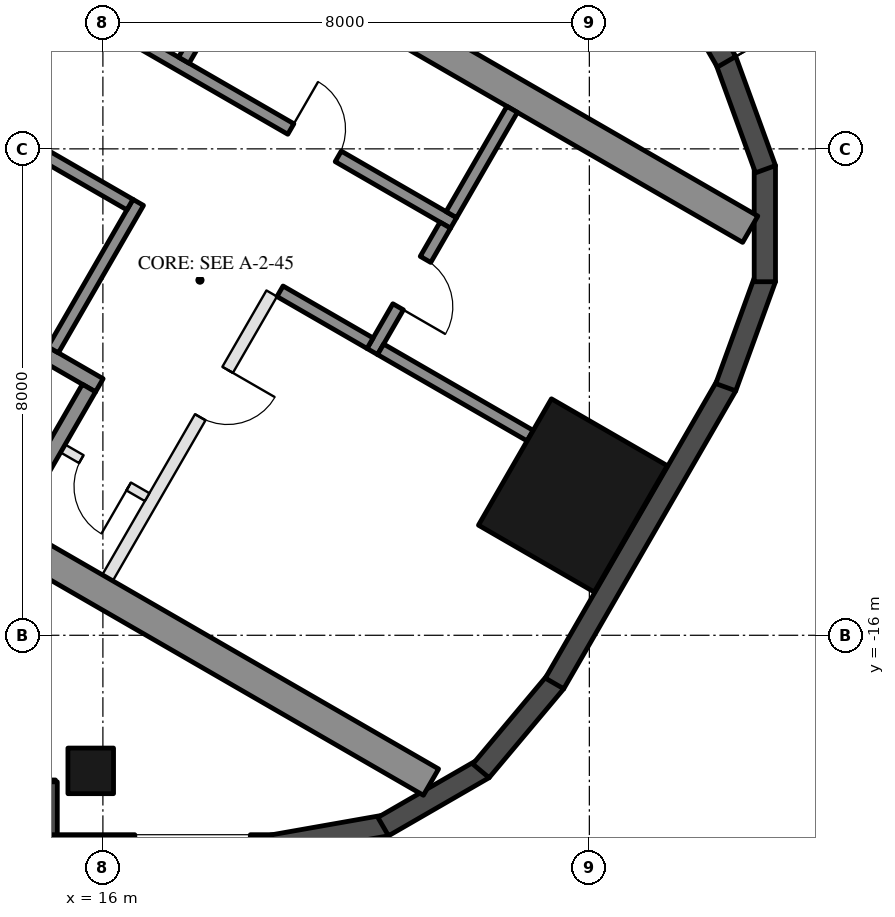
"""IFC4 building model, lengths in metres.
Left out: names, types, materials, properties, quantities, classifications, styles, units other than length and angle.
Written with IfcOpenShell. Run it as: python <this file> out.ifc"""

import sys

from ifc_helpers import new_model, si_unit, direction, frame, frame_2d, origin, origin_2d, place, context, subcontext, project, spatial, rectangle, hollow_rectangle, extrude, element, fill, save


model = new_model("IFC4")
c1 = context("Model", 3, precision=1e-05, world=origin(), true_north=direction((0.0, 1.0)))
c2 = subcontext(c1, "Body", "Model", "MODEL_VIEW")
j1 = project(units=[si_unit("LENGTHUNIT", "METRE"), si_unit("PLANEANGLEUNIT", "RADIAN")], contexts=[c1])
p1 = place(None, origin())
s1 = spatial("IfcSite", under=j1, at=p1, CompositionType="ELEMENT")
p2 = place(p1, origin())
s2 = spatial("IfcBuilding", under=s1, at=p2, CompositionType="ELEMENT")
p3 = place(p2, frame((0.0, 0.0, 198.4)))
s3 = spatial("IfcBuildingStorey", under=s2, at=p3, CompositionType="ELEMENT", Elevation=198.4)
p4 = place(p3, frame((15.8, -18.23, 0.0), z_axis=(0.0, 0.0, 1.0), x_axis=(-1.0, 0.0, 0.0)))
e1 = element("IfcColumn", 1, at=p4, inside=s3, PredefinedType="COLUMN", context=c2, shape_type="SweptSolid", body=[
    extrude(hollow_rectangle(XDim=0.75, YDim=0.75, WallThickness=0.035, at=origin_2d()), origin(), (0.0, 0.0, 1.0), 3.7),
])
p5 = place(p3, frame((23.729, -13.7, 0.0), z_axis=(0.0, 0.0, 1.0), x_axis=(0.5, 0.866025403784, 0.0)))
e2 = element("IfcColumn", 2, at=p5, inside=s3, PredefinedType="COLUMN", context=c2, shape_type="SweptSolid", body=[
    extrude(hollow_rectangle(XDim=2.4, YDim=2.2, WallThickness=0.06, at=origin_2d()), origin(), (0.0, 0.0, 1.0), 3.7),
])
p6 = place(p3, frame((8.48, -18.555, 0.0), z_axis=(0.0, 0.0, 1.0), x_axis=(1.0, 0.0, 0.0)))
e3 = element("IfcWall", 3, at=p6, inside=s3, PredefinedType="SOLIDWALL", context=c2, shape_type="SweptSolid", body=[
    extrude(rectangle(XDim=6.74, YDim=0.35, at=frame_2d((3.37, 0.0))), origin(), (0.0, 0.0, 1.0), 3.55),
])
p7 = place(p6, frame((0.32, 0.0, 0.0)))
e4 = element("IfcOpeningElement", 4, at=p7, cuts=e3, PredefinedType="OPENING", context=c2, shape_type="SweptSolid", body=[
    extrude(rectangle(XDim=2.4, YDim=2.4, at=frame_2d((1.2, 1.2))), frame((0.0, 0.185, 0.0), z_axis=(0.0, -1.0, 0.0), x_axis=(1.0, 0.0, 0.0)), (0.0, 0.0, 1.0), 0.37),
])
p8 = place(p6, frame((3.02, 0.0, 0.3)))
e5 = element("IfcOpeningElement", 5, at=p8, cuts=e3, PredefinedType="OPENING", context=c2, shape_type="SweptSolid", body=[
    extrude(rectangle(XDim=2.9, YDim=2.65, at=frame_2d((1.45, 1.325))), frame((0.0, 0.185, 0.0), z_axis=(0.0, -1.0, 0.0), x_axis=(1.0, 0.0, 0.0)), (0.0, 0.0, 1.0), 0.37),
])
p9 = place(p3, frame((15.075, -18.41, 0.0), z_axis=(0.0, 0.0, 1.0), x_axis=(0.0, -1.0, 0.0)))
e6 = element("IfcWall", 6, at=p9, inside=s3, PredefinedType="SOLIDWALL", context=c2, shape_type="SweptSolid", body=[
    extrude(rectangle(XDim=1.22, YDim=0.35, at=frame_2d((0.61, 0.0))), origin(), (0.0, 0.0, 1.0), 3.55),
])
p10 = place(p3, frame((14.9, -19.455, 0.0), z_axis=(0.0, 0.0, 1.0), x_axis=(1.0, 0.0, 0.0)))
e7 = element("IfcWall", 7, at=p10, inside=s3, PredefinedType="SOLIDWALL", context=c2, shape_type="SweptSolid", body=[
    extrude(rectangle(XDim=3.916, YDim=0.35, at=frame_2d((1.958, 0.0))), origin(), (0.0, 0.0, 1.0), 3.55),
])
p11 = place(p10, frame((1.625, 0.0, 0.3)))
e8 = element("IfcOpeningElement", 8, at=p11, cuts=e7, PredefinedType="OPENING", context=c2, shape_type="SweptSolid", body=[
    extrude(rectangle(XDim=1.9, YDim=2.65, at=frame_2d((0.95, 1.325))), frame((0.0, 0.185, 0.0), z_axis=(0.0, -1.0, 0.0), x_axis=(1.0, 0.0, 0.0)), (0.0, 0.0, 1.0), 0.37),
])
p12 = place(p3, frame((18.785, -19.458, 0.0), z_axis=(0.0, 0.0, 1.0), x_axis=(0.984798995425, 0.173697837091, 0.0)))
e9 = element("IfcWall", 9, at=p12, inside=s3, PredefinedType="SOLIDWALL", context=c2, shape_type="SweptSolid", body=[
    extrude(rectangle(XDim=1.91, YDim=0.35, at=frame_2d((0.955, 0.0))), origin(), (0.0, 0.0, 1.0), 3.55),
])
for number, where, z_axis, x_axis in (
    (10, (20.61, -19.147, 0.0), (0.0, 0.0, 1.0), (0.866, 0.5, 0.0)),
    (11, (22.217, -18.231, 0.0), (0.0, 0.0, 1.0), (0.643, 0.766, 0.0)),
):
    element("IfcWall", number, at=place(p3, frame(where, z_axis=z_axis, x_axis=x_axis)), inside=s3, PredefinedType="SOLIDWALL", context=c2, shape_type="SweptSolid", body=[
        extrude(rectangle(XDim=1.91, YDim=0.35, at=frame_2d((0.955, 0.0))), origin(), (0.0, 0.0, 1.0), 3.55),
    ])
p13 = place(p3, frame((23.427, -16.792, 0.0), z_axis=(0.0, 0.0, 1.0), x_axis=(0.500018773155, 0.866014564827, 0.0)))
e12 = element("IfcWall", 12, at=p13, inside=s3, PredefinedType="SOLIDWALL", context=c2, shape_type="SweptSolid", body=[
    extrude(rectangle(XDim=5.658, YDim=0.35, at=frame_2d((2.829, 0.0))), origin(), (0.0, 0.0, 1.0), 3.55),
])
for number, where, z_axis, x_axis in (
    (13, (26.244, -11.92, 0.0), (0.0, 0.0, 1.0), (0.342, 0.94, 0.0)),
    (14, (26.886, -10.185, 0.0), (0.0, 0.0, 1.0), (0.0, 1.0, 0.0)),
    (15, (26.897, -8.335, 0.0), (0.0, 0.0, 1.0), (-0.342, 0.94, 0.0)),
):
    element("IfcWall", number, at=place(p3, frame(where, z_axis=z_axis, x_axis=x_axis)), inside=s3, PredefinedType="SOLIDWALL", context=c2, shape_type="SweptSolid", body=[
        extrude(rectangle(XDim=1.91, YDim=0.35, at=frame_2d((0.955, 0.0))), origin(), (0.0, 0.0, 1.0), 3.55),
    ])
p14 = place(p3, frame((26.257, -6.567, 0.0), z_axis=(0.0, 0.0, 1.0), x_axis=(-0.500023526245, 0.866011820475, 0.0)))
e16 = element("IfcWall", 16, at=p14, inside=s3, PredefinedType="SOLIDWALL", context=c2, shape_type="SweptSolid", body=[
    extrude(rectangle(XDim=11.816, YDim=0.35, at=frame_2d((5.908, 0.0))), origin(), (0.0, 0.0, 1.0), 3.55),
])
p15 = place(p14, frame((0.38, 0.0, 0.3)))
e17 = element("IfcOpeningElement", 17, at=p15, cuts=e16, PredefinedType="OPENING", context=c2, shape_type="SweptSolid", body=[
    extrude(rectangle(XDim=1.9, YDim=2.65, at=frame_2d((0.95, 1.325))), frame((0.0, 0.185, 0.0), z_axis=(0.0, -1.0, 0.0), x_axis=(1.0, 0.0, 0.0)), (0.0, 0.0, 1.0), 0.37),
])
p16 = place(p14, frame((7.791, 0.0, 0.0)))
e18 = element("IfcOpeningElement", 18, at=p16, cuts=e16, PredefinedType="OPENING", context=c2, shape_type="SweptSolid", body=[
    extrude(rectangle(XDim=2.4, YDim=2.4, at=frame_2d((1.2, 1.2))), frame((0.0, 0.185, 0.0), z_axis=(0.0, -1.0, 0.0), x_axis=(1.0, 0.0, 0.0)), (0.0, 0.0, 1.0), 0.37),
])
p17 = place(p14, frame((3.741, 0.0, 0.3)))
e19 = element("IfcOpeningElement", 19, at=p17, cuts=e16, PredefinedType="OPENING", context=c2, shape_type="SweptSolid", body=[
    extrude(rectangle(XDim=1.7, YDim=2.65, at=frame_2d((0.85, 1.325))), frame((0.0, 0.185, 0.0), z_axis=(0.0, -1.0, 0.0), x_axis=(1.0, 0.0, 0.0)), (0.0, 0.0, 1.0), 0.37),
])
p18 = place(p14, frame((5.741, 0.0, 0.3)))
e20 = element("IfcOpeningElement", 20, at=p18, cuts=e16, PredefinedType="OPENING", context=c2, shape_type="SweptSolid", body=[
    extrude(rectangle(XDim=1.7, YDim=2.65, at=frame_2d((0.85, 1.325))), frame((0.0, 0.185, 0.0), z_axis=(0.0, -1.0, 0.0), x_axis=(1.0, 0.0, 0.0)), (0.0, 0.0, 1.0), 0.37),
])
for number, where, z_axis, x_axis in (
    (21, (8.547, -10.997, 0.0), (0.0, 0.0, 1.0), (0.866, -0.5, 0.0)),
    (22, (13.797, -1.903, 0.0), (0.0, 0.0, 1.0), (0.866, -0.5, 0.0)),
):
    element("IfcWall", number, at=place(p3, frame(where, z_axis=z_axis, x_axis=x_axis)), inside=s3, PredefinedType="SHEAR", context=c2, shape_type="SweptSolid", body=[
        extrude(rectangle(XDim=14.837, YDim=0.5, at=frame_2d((7.418, 0.0))), origin(), (0.0, 0.0, 1.0), 3.5),
    ])
p19 = place(p3, frame((10.356, -8.664, 0.0), z_axis=(0.0, 0.0, 1.0), x_axis=(0.866028629588, -0.499994412703, 0.0)))
e23 = element("IfcWall", 23, at=p19, inside=s3, PredefinedType="SHEAR", context=c2, shape_type="SweptSolid", body=[
    extrude(rectangle(XDim=6.45, YDim=0.25, at=frame_2d((3.225, 0.0))), origin(), (0.0, 0.0, 1.0), 3.5),
])
p20 = place(p19, frame((0.3, 0.0, 0.0)))
e24 = element("IfcOpeningElement", 24, at=p20, cuts=e23, PredefinedType="OPENING", context=c2, shape_type="SweptSolid", body=[
    extrude(rectangle(XDim=1.0, YDim=2.1, at=frame_2d((0.5, 1.05))), frame((0.0, 0.135, 0.0), z_axis=(0.0, -1.0, 0.0), x_axis=(1.0, 0.0, 0.0)), (0.0, 0.0, 1.0), 0.27),
])
p21 = place(p3, frame((14.496, -14.143, 0.0), z_axis=(0.0, 0.0, 1.0), x_axis=(0.500062241894, 0.865989465428, 0.0)))
e25 = element("IfcWall", 25, at=p21, inside=s3, PredefinedType="SHEAR", context=c2, shape_type="SweptSolid", body=[
    extrude(rectangle(XDim=2.55, YDim=0.25, at=frame_2d((1.275, 0.0))), origin(), (0.0, 0.0, 1.0), 3.5),
])
p22 = place(p3, frame((15.181, -11.305, 0.0), z_axis=(0.0, 0.0, 1.0), x_axis=(0.49994636267, 0.866056369097, 0.0)))
e26 = element("IfcWall", 26, at=p22, inside=s3, PredefinedType="SHEAR", context=c2, shape_type="SweptSolid", body=[
    extrude(rectangle(XDim=2.8, YDim=0.2, at=frame_2d((1.4, 0.0))), origin(), (0.0, 0.0, 1.0), 3.5),
])
p23 = place(p3, frame((14.02, -7.517, 0.0), z_axis=(0.0, 0.0, 1.0), x_axis=(0.866034573852, -0.49998411664, 0.0)))
e27 = element("IfcWall", 27, at=p23, inside=s3, PredefinedType="SHEAR", context=c2, shape_type="SweptSolid", body=[
    extrude(rectangle(XDim=2.8, YDim=0.2, at=frame_2d((1.4, 0.0))), origin(), (0.0, 0.0, 1.0), 3.5),
])
p24 = place(p3, frame((12.968, -4.138, 0.0), z_axis=(0.0, 0.0, 1.0), x_axis=(0.866028328073, -0.49999493495, 0.0)))
e28 = element("IfcWall", 28, at=p24, inside=s3, PredefinedType="SHEAR", context=c2, shape_type="SweptSolid", body=[
    extrude(rectangle(XDim=10.16, YDim=0.2, at=frame_2d((5.08, 0.0))), origin(), (0.0, 0.0, 1.0), 3.5),
])
p25 = place(p24, frame((1.99, 0.0, 0.0)))
e29 = element("IfcOpeningElement", 29, at=p25, cuts=e28, PredefinedType="OPENING", context=c2, shape_type="SweptSolid", body=[
    extrude(rectangle(XDim=0.9, YDim=2.1, at=frame_2d((0.45, 1.05))), frame((0.0, 0.11, 0.0), z_axis=(0.0, -1.0, 0.0), x_axis=(1.0, 0.0, 0.0)), (0.0, 0.0, 1.0), 0.22),
])
p26 = place(p24, frame((7.07, 0.0, 0.0)))
e30 = element("IfcOpeningElement", 30, at=p26, cuts=e28, PredefinedType="OPENING", context=c2, shape_type="SweptSolid", body=[
    extrude(rectangle(XDim=0.9, YDim=2.1, at=frame_2d((0.45, 1.05))), frame((0.0, 0.11, 0.0), z_axis=(0.0, -1.0, 0.0), x_axis=(1.0, 0.0, 0.0)), (0.0, 0.0, 1.0), 0.22),
])
p27 = place(p3, frame((20.43, -11.333, 0.0), z_axis=(0.0, 0.0, 1.0), x_axis=(0.500001309137, 0.866024647952, 0.0)))
e31 = element("IfcWall", 31, at=p27, inside=s3, PredefinedType="SHEAR", context=c2, shape_type="SweptSolid", body=[
    extrude(rectangle(XDim=2.4, YDim=0.2, at=frame_2d((1.2, 0.0))), origin(), (0.0, 0.0, 1.0), 3.5),
])
p28 = place(p27, frame((0.85, 0.0, 0.0)))
e32 = element("IfcOpeningElement", 32, at=p28, cuts=e31, PredefinedType="OPENING", context=c2, shape_type="SweptSolid", body=[
    extrude(rectangle(XDim=0.9, YDim=2.1, at=frame_2d((0.45, 1.05))), frame((0.0, 0.11, 0.0), z_axis=(0.0, -1.0, 0.0), x_axis=(1.0, 0.0, 0.0)), (0.0, 0.0, 1.0), 0.22),
])
p29 = place(p3, frame((18.913, -10.342, 0.0), z_axis=(0.0, 0.0, 1.0), x_axis=(0.866038183914, -0.499977863513, 0.0)))
e33 = element("IfcWall", 33, at=p29, inside=s3, PredefinedType="SHEAR", context=c2, shape_type="SweptSolid", body=[
    extrude(rectangle(XDim=1.71, YDim=0.2, at=frame_2d((0.855, 0.0))), origin(), (0.0, 0.0, 1.0), 3.5),
])
for number, where, z_axis, x_axis in (
    (34, (17.331, -6.542, 0.0), (0.0, 0.0, 1.0), (0.5, 0.866, 0.0)),
    (35, (21.73, -9.082, 0.0), (0.0, 0.0, 1.0), (0.5, 0.866, 0.0)),
):
    element("IfcWall", number, at=place(p3, frame(where, z_axis=z_axis, x_axis=x_axis)), inside=s3, PredefinedType="SHEAR", context=c2, shape_type="SweptSolid", body=[
        extrude(rectangle(XDim=2.0, YDim=0.2, at=frame_2d((1.0, 0.0))), origin(), (0.0, 0.0, 1.0), 3.5),
    ])
p30 = place(p3, frame((20.567, -11.297, 0.0), z_axis=(0.0, 0.0, 1.0), x_axis=(0.866055327414, -0.49994816717, 0.0)))
e36 = element("IfcWall", 36, at=p30, inside=s3, PredefinedType="SHEAR", context=c2, shape_type="SweptSolid", body=[
    extrude(rectangle(XDim=2.84, YDim=0.2, at=frame_2d((1.42, 0.0))), origin(), (0.0, 0.0, 1.0), 3.5),
])
p31 = place(p3, frame((16.076, -15.055, 0.0), z_axis=(0.0, 0.0, 1.0), x_axis=(0.499995103361, 0.866028230842, 0.0)))
e37 = element("IfcWall", 37, at=p31, inside=s3, PredefinedType="PARTITIONING", context=c2, shape_type="SweptSolid", body=[
    extrude(rectangle(XDim=5.4, YDim=0.2, at=frame_2d((2.7, 0.0))), origin(), (0.0, 0.0, 1.0), 3.5),
])
p32 = place(p31, frame((3.05, 0.0, 0.0)))
e38 = element("IfcOpeningElement", 38, at=p32, cuts=e37, PredefinedType="OPENING", context=c2, shape_type="SweptSolid", body=[
    extrude(rectangle(XDim=0.9, YDim=2.1, at=frame_2d((0.45, 1.05))), frame((0.0, 0.11, 0.0), z_axis=(0.0, -1.0, 0.0), x_axis=(1.0, 0.0, 0.0)), (0.0, 0.0, 1.0), 0.22),
])
p33 = place(p3, frame((15.342, -12.928, 0.0), z_axis=(0.0, 0.0, 1.0), x_axis=(0.865989903783, -0.500061482766, 0.0)))
e39 = element("IfcWall", 39, at=p33, inside=s3, PredefinedType="PARTITIONING", context=c2, shape_type="SweptSolid", body=[
    extrude(rectangle(XDim=1.6, YDim=0.15, at=frame_2d((0.8, 0.0))), origin(), (0.0, 0.0, 1.0), 3.5),
])
p34 = place(p33, frame((0.35, 0.0, 0.0)))
e40 = element("IfcOpeningElement", 40, at=p34, cuts=e39, PredefinedType="OPENING", context=c2, shape_type="SweptSolid", body=[
    extrude(rectangle(XDim=0.9, YDim=2.1, at=frame_2d((0.45, 1.05))), frame((0.0, 0.085, 0.0), z_axis=(0.0, -1.0, 0.0), x_axis=(1.0, 0.0, 0.0)), (0.0, 0.0, 1.0), 0.17),
])
p35 = place(p34, frame((0.9, 0.0, 0.0), z_axis=(0.0, 0.0, 1.0), x_axis=(-1.0, 0.0, 0.0)))
e41 = element("IfcDoor", 41, at=p35, inside=s3, OperationType="SINGLE_SWING_LEFT", PredefinedType="DOOR", context=c2, shape_type="SweptSolid", body=[
    extrude(rectangle(XDim=0.9, YDim=2.1, at=frame_2d((0.45, 1.05))), frame((0.0, 0.025, 0.0), z_axis=(0.0, -1.0, 0.0), x_axis=(1.0, 0.0, 0.0)), (0.0, 0.0, 1.0), 0.05),
])
fill(e40, e41)
p36 = place(p26, origin())
e42 = element("IfcDoor", 42, at=p36, inside=s3, OperationType="SINGLE_SWING_LEFT", PredefinedType="DOOR", context=c2, shape_type="SweptSolid", body=[
    extrude(rectangle(XDim=0.9, YDim=2.1, at=frame_2d((0.45, 1.05))), frame((0.0, 0.025, 0.0), z_axis=(0.0, -1.0, 0.0), x_axis=(1.0, 0.0, 0.0)), (0.0, 0.0, 1.0), 0.05),
])
fill(e30, e42)
p37 = place(p28, frame((0.9, 0.0, 0.0), z_axis=(0.0, 0.0, 1.0), x_axis=(-1.0, 0.0, 0.0)))
e43 = element("IfcDoor", 43, at=p37, inside=s3, OperationType="SINGLE_SWING_RIGHT", PredefinedType="DOOR", context=c2, shape_type="SweptSolid", body=[
    extrude(rectangle(XDim=0.9, YDim=2.1, at=frame_2d((0.45, 1.05))), frame((0.0, 0.025, 0.0), z_axis=(0.0, -1.0, 0.0), x_axis=(1.0, 0.0, 0.0)), (0.0, 0.0, 1.0), 0.05),
])
fill(e32, e43)
p38 = place(p32, frame((0.9, 0.0, 0.0), z_axis=(0.0, 0.0, 1.0), x_axis=(-1.0, 0.0, 0.0)))
e44 = element("IfcDoor", 44, at=p38, inside=s3, OperationType="SINGLE_SWING_LEFT", PredefinedType="DOOR", context=c2, shape_type="SweptSolid", body=[
    extrude(rectangle(XDim=0.9, YDim=2.1, at=frame_2d((0.45, 1.05))), frame((0.0, 0.025, 0.0), z_axis=(0.0, -1.0, 0.0), x_axis=(1.0, 0.0, 0.0)), (0.0, 0.0, 1.0), 0.05),
])
fill(e38, e44)
save(model, sys.argv[1])
